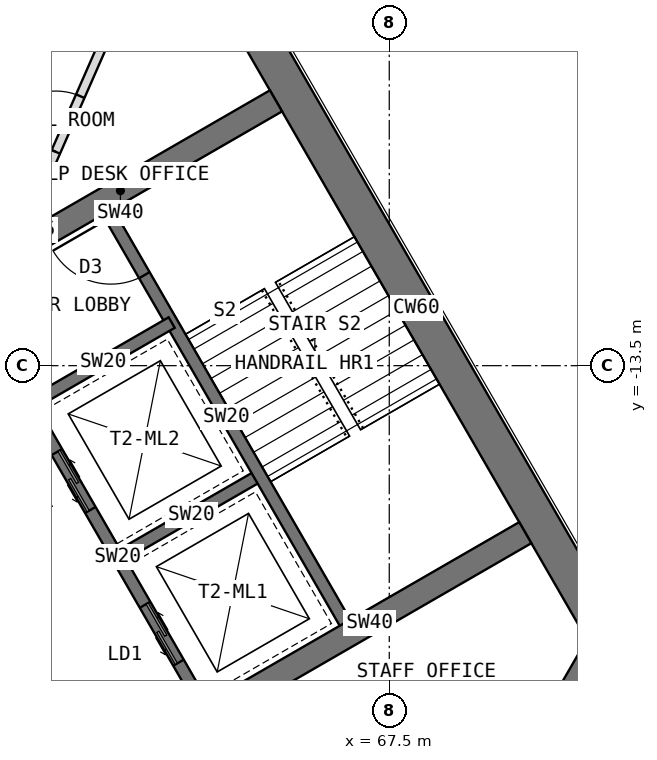
"""IFC4 building model, lengths in metres.
Left out: names, types, materials, properties, quantities, classifications, styles, units other than length and angle.
Written with IfcOpenShell. Run it as: python <this file> out.ifc"""

import sys

from ifc_helpers import new_model, si_unit, direction, frame, frame_2d, origin, place, context, subcontext, project, spatial, rectangle, extrude, element, fill, save


model = new_model("IFC4")
c1 = context("Model", 3, precision=1e-05, world=origin(), true_north=direction((0.0, 1.0)))
c2 = subcontext(c1, "Body", "Model", "MODEL_VIEW")
j1 = project(units=[si_unit("LENGTHUNIT", "METRE"), si_unit("PLANEANGLEUNIT", "RADIAN")], contexts=[c1])
p1 = place(None, origin())
s1 = spatial("IfcSite", under=j1, at=p1, CompositionType="ELEMENT")
p2 = place(p1, origin())
s2 = spatial("IfcBuilding", under=s1, at=p2, CompositionType="ELEMENT")
p3 = place(p2, frame((0.0, 0.0, 101.5)))
s3 = spatial("IfcBuildingStorey", under=s2, at=p3, CompositionType="ELEMENT", Elevation=101.5)
p4 = place(p3, frame((68.822, -21.939, 0.0), z_axis=(0.0, 0.0, 1.0), x_axis=(0.500024481964, 0.866011268655, 0.0)))
e1 = element("IfcWall", 1, at=p4, inside=s3, PredefinedType="SHEAR", context=c2, shape_type="SweptSolid", body=[
    extrude(rectangle(XDim=4.548, YDim=0.6, at=frame_2d((2.274, 0.0))), origin(), (0.0, 0.0, 1.0), 4.0),
])
p5 = place(p3, frame((71.096, -18.0, 0.0), z_axis=(0.0, 0.0, 1.0), x_axis=(-0.500005998175, 0.866021940709, 0.0)))
e2 = element("IfcWall", 2, at=p5, inside=s3, PredefinedType="SHEAR", context=c2, shape_type="SweptSolid", body=[
    extrude(rectangle(XDim=12.596, YDim=0.6, at=frame_2d((6.298, 0.0))), origin(), (0.0, 0.0, 1.0), 4.0),
])
p6 = place(p3, frame((64.484, -19.164, 0.0), z_axis=(0.0, 0.0, 1.0), x_axis=(-0.49999894854, 0.866026010844, 0.0)))
e3 = element("IfcWall", 3, at=p6, inside=s3, PredefinedType="SHEAR", context=c2, shape_type="SweptSolid", body=[
    extrude(rectangle(XDim=8.0, YDim=0.2, at=frame_2d((4.0, 0.0))), origin(), (0.0, 0.0, 1.0), 4.0),
])
p7 = place(p6, frame((6.3, 0.0, 0.0)))
e4 = element("IfcOpeningElement", 4, at=p7, cuts=e3, PredefinedType="OPENING", context=c2, shape_type="SweptSolid", body=[
    extrude(rectangle(XDim=1.2, YDim=2.1, at=frame_2d((0.6, 1.05))), frame((0.0, 0.11, 0.0), z_axis=(0.0, -1.0, 0.0), x_axis=(1.0, 0.0, 0.0)), (0.0, 0.0, 1.0), 0.22),
])
p8 = place(p6, frame((0.9, 0.0, 0.0)))
e5 = element("IfcOpeningElement", 5, at=p8, cuts=e3, PredefinedType="OPENING", context=c2, shape_type="SweptSolid", body=[
    extrude(rectangle(XDim=1.1, YDim=2.2, at=frame_2d((0.55, 1.1))), frame((0.0, 0.11, 0.0), z_axis=(0.0, -1.0, 0.0), x_axis=(1.0, 0.0, 0.0)), (0.0, 0.0, 1.0), 0.22),
])
p9 = place(p6, frame((3.8, 0.0, 0.0)))
e6 = element("IfcOpeningElement", 6, at=p9, cuts=e3, PredefinedType="OPENING", context=c2, shape_type="SweptSolid", body=[
    extrude(rectangle(XDim=1.1, YDim=2.2, at=frame_2d((0.55, 1.1))), frame((0.0, 0.11, 0.0), z_axis=(0.0, -1.0, 0.0), x_axis=(1.0, 0.0, 0.0)), (0.0, 0.0, 1.0), 0.22),
])
p10 = place(p3, frame((63.12, -16.603, 0.0), z_axis=(0.0, 0.0, 1.0), x_axis=(0.866062058628, 0.499936506574, 0.0)))
e7 = element("IfcWall", 7, at=p10, inside=s3, PredefinedType="SHEAR", context=c2, shape_type="SweptSolid", body=[
    extrude(rectangle(XDim=2.6, YDim=0.2, at=frame_2d((1.3, 0.0))), origin(), (0.0, 0.0, 1.0), 4.0),
])
p11 = place(p3, frame((61.67, -14.091, 0.0), z_axis=(0.0, 0.0, 1.0), x_axis=(0.86603858612, 0.49997716683, 0.0)))
e8 = element("IfcWall", 8, at=p11, inside=s3, PredefinedType="SHEAR", context=c2, shape_type="SweptSolid", body=[
    extrude(rectangle(XDim=2.6, YDim=0.2, at=frame_2d((1.3, 0.0))), origin(), (0.0, 0.0, 1.0), 4.0),
])
p12 = place(p3, frame((66.822, -17.814, 0.0), z_axis=(0.0, 0.0, 1.0), x_axis=(-0.49999894854, 0.866026010844, 0.0)))
e9 = element("IfcWall", 9, at=p12, inside=s3, PredefinedType="SHEAR", context=c2, shape_type="SweptSolid", body=[
    extrude(rectangle(XDim=8.0, YDim=0.2, at=frame_2d((4.0, 0.0))), origin(), (0.0, 0.0, 1.0), 4.0),
])
p13 = place(p12, frame((6.7, 0.0, 0.0)))
e10 = element("IfcOpeningElement", 10, at=p13, cuts=e9, PredefinedType="OPENING", context=c2, shape_type="SweptSolid", body=[
    extrude(rectangle(XDim=1.1, YDim=2.1, at=frame_2d((0.55, 1.05))), frame((0.0, 0.11, 0.0), z_axis=(0.0, -1.0, 0.0), x_axis=(1.0, 0.0, 0.0)), (0.0, 0.0, 1.0), 0.22),
])
p14 = place(p3, frame((60.52, -12.099, 0.0), z_axis=(0.0, 0.0, 1.0), x_axis=(0.866009424208, 0.500027676417, 0.0)))
e11 = element("IfcWall", 11, at=p14, inside=s3, PredefinedType="SHEAR", context=c2, shape_type="SweptSolid", body=[
    extrude(rectangle(XDim=5.908, YDim=0.4, at=frame_2d((2.954, 0.0))), origin(), (0.0, 0.0, 1.0), 4.0),
])
p15 = place(p3, frame((64.62, -19.201, 0.0), z_axis=(0.0, 0.0, 1.0), x_axis=(0.866027317282, 0.49999668571, 0.0)))
e12 = element("IfcWall", 12, at=p15, inside=s3, PredefinedType="SHEAR", context=c2, shape_type="SweptSolid", body=[
    extrude(rectangle(XDim=5.908, YDim=0.4, at=frame_2d((2.954, 0.0))), origin(), (0.0, 0.0, 1.0), 4.0),
])
p16 = place(p3, frame((61.281, -11.66, 0.0), z_axis=(0.0, 0.0, 1.0), x_axis=(0.401686926791, 0.915777054116, 0.0)))
e13 = element("IfcWall", 13, at=p16, inside=s3, PredefinedType="PARTITIONING", context=c2, shape_type="SweptSolid", body=[
    extrude(rectangle(XDim=4.661, YDim=0.15, at=frame_2d((2.331, 0.0))), origin(), (0.0, 0.0, 1.0), 3.8),
])
p17 = place(p16, frame((1.831, 0.0, 0.0)))
e14 = element("IfcOpeningElement", 14, at=p17, cuts=e13, PredefinedType="OPENING", context=c2, shape_type="SweptSolid", body=[
    extrude(rectangle(XDim=1.0, YDim=2.1, at=frame_2d((0.5, 1.05))), frame((0.0, 0.085, 0.0), z_axis=(0.0, -1.0, 0.0), x_axis=(1.0, 0.0, 0.0)), (0.0, 0.0, 1.0), 0.17),
])
p18 = place(p8, origin())
e15 = element("IfcDoor", 15, at=p18, inside=s3, OperationType="DOUBLE_DOOR_SLIDING", PredefinedType="DOOR", context=c2, shape_type="SweptSolid", body=[
    extrude(rectangle(XDim=1.1, YDim=2.2, at=frame_2d((0.55, 1.1))), frame((0.0, 0.025, 0.0), z_axis=(0.0, -1.0, 0.0), x_axis=(1.0, 0.0, 0.0)), (0.0, 0.0, 1.0), 0.05),
])
fill(e5, e15)
p19 = place(p9, origin())
e16 = element("IfcDoor", 16, at=p19, inside=s3, OperationType="DOUBLE_DOOR_SLIDING", PredefinedType="DOOR", context=c2, shape_type="SweptSolid", body=[
    extrude(rectangle(XDim=1.1, YDim=2.2, at=frame_2d((0.55, 1.1))), frame((0.0, 0.025, 0.0), z_axis=(0.0, -1.0, 0.0), x_axis=(1.0, 0.0, 0.0)), (0.0, 0.0, 1.0), 0.05),
])
fill(e6, e16)
p20 = place(p13, origin())
e17 = element("IfcDoor", 17, at=p20, inside=s3, OperationType="SINGLE_SWING_RIGHT", PredefinedType="DOOR", context=c2, shape_type="SweptSolid", body=[
    extrude(rectangle(XDim=1.1, YDim=2.1, at=frame_2d((0.55, 1.05))), frame((0.0, 0.025, 0.0), z_axis=(0.0, -1.0, 0.0), x_axis=(1.0, 0.0, 0.0)), (0.0, 0.0, 1.0), 0.05),
])
fill(e10, e17)
p21 = place(p17, origin())
e18 = element("IfcDoor", 18, at=p21, inside=s3, OperationType="SINGLE_SWING_LEFT", PredefinedType="DOOR", context=c2, shape_type="SweptSolid", body=[
    extrude(rectangle(XDim=1.0, YDim=2.1, at=frame_2d((0.5, 1.05))), frame((0.0, 0.025, 0.0), z_axis=(0.0, -1.0, 0.0), x_axis=(1.0, 0.0, 0.0)), (0.0, 0.0, 1.0), 0.05),
])
fill(e14, e18)
save(model, sys.argv[1])
